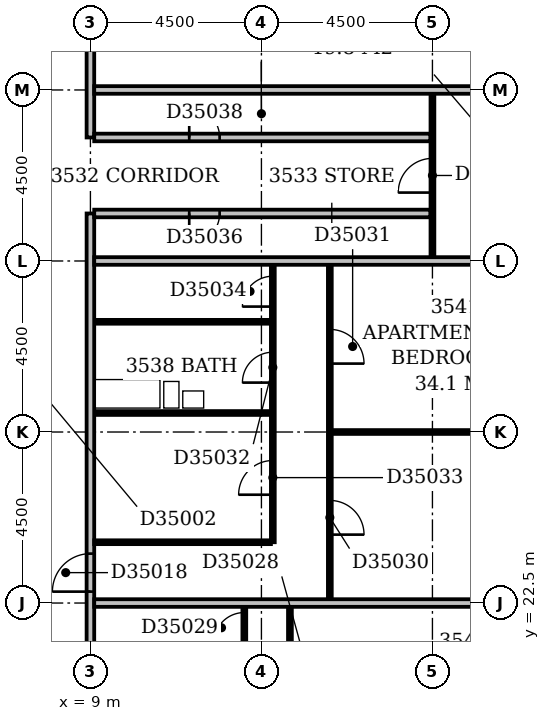
"""IFC4 building model, lengths in metres.
Left out: names, types, materials, properties, quantities, classifications, styles, units other than length and angle.
Written with IfcOpenShell. Run it as: python <this file> out.ifc"""

import sys

from ifc_helpers import new_model, si_unit, direction, frame, frame_2d, origin, place, context, subcontext, project, spatial, rectangle, extrude, element, fill, save


model = new_model("IFC4")
c1 = context("Model", 3, precision=1e-05, world=origin(), true_north=direction((0.0, 1.0)))
c2 = subcontext(c1, "Body", "Model", "MODEL_VIEW")
j1 = project(units=[si_unit("LENGTHUNIT", "METRE"), si_unit("PLANEANGLEUNIT", "RADIAN")], contexts=[c1])
p1 = place(None, origin())
s1 = spatial("IfcSite", under=j1, at=p1, CompositionType="ELEMENT")
p2 = place(p1, origin())
s2 = spatial("IfcBuilding", under=s1, at=p2, CompositionType="ELEMENT")
p3 = place(p2, frame((0.0, 0.0, 141.2)))
s3 = spatial("IfcBuildingStorey", under=s2, at=p3, CompositionType="ELEMENT", Elevation=141.2)
p4 = place(p3, frame((9.0, 5.0, 0.0), z_axis=(0.0, 0.0, 1.0), x_axis=(0.0, 1.0, 0.0)))
e1 = element("IfcWall", 1, at=p4, inside=s3, PredefinedType="PARTITIONING", context=c2, shape_type="SweptSolid", body=[
    extrude(rectangle(XDim=27.75, YDim=0.2, at=frame_2d((13.875, 0.0))), origin(), (0.0, 0.0, 1.0), 3.3),
])
p5 = place(p4, frame((17.8, 0.0, 0.0)))
e2 = element("IfcOpeningElement", 2, at=p5, cuts=e1, PredefinedType="OPENING", context=c2, shape_type="SweptSolid", body=[
    extrude(rectangle(XDim=1.0, YDim=2.1, at=frame_2d((0.5, 1.05))), frame((0.0, 0.112, 0.0), z_axis=(0.0, -1.0, 0.0), x_axis=(1.0, 0.0, 0.0)), (0.0, 0.0, 1.0), 0.224),
])
p6 = place(p4, frame((14.95, 0.0, 0.0)))
e3 = element("IfcOpeningElement", 3, at=p6, cuts=e1, PredefinedType="OPENING", context=c2, shape_type="SweptSolid", body=[
    extrude(rectangle(XDim=1.0, YDim=2.1, at=frame_2d((0.5, 1.05))), frame((0.0, 0.112, 0.0), z_axis=(0.0, -1.0, 0.0), x_axis=(1.0, 0.0, 0.0)), (0.0, 0.0, 1.0), 0.224),
])
p7 = place(p4, frame((11.7, 0.0, 0.0)))
e4 = element("IfcOpeningElement", 4, at=p7, cuts=e1, PredefinedType="OPENING", context=c2, shape_type="SweptSolid", body=[
    extrude(rectangle(XDim=1.0, YDim=2.1, at=frame_2d((0.5, 1.05))), frame((0.0, 0.112, 0.0), z_axis=(0.0, -1.0, 0.0), x_axis=(1.0, 0.0, 0.0)), (0.0, 0.0, 1.0), 0.224),
])
p8 = place(p4, frame((1.5, 0.0, 0.0)))
e5 = element("IfcOpeningElement", 5, at=p8, cuts=e1, PredefinedType="OPENING", context=c2, shape_type="SweptSolid", body=[
    extrude(rectangle(XDim=0.9, YDim=2.1, at=frame_2d((0.45, 1.05))), frame((0.0, 0.112, 0.0), z_axis=(0.0, -1.0, 0.0), x_axis=(1.0, 0.0, 0.0)), (0.0, 0.0, 1.0), 0.224),
])
p9 = place(p3, frame((14.25, 18.1, 0.0), z_axis=(0.0, 0.0, 1.0), x_axis=(0.0, 1.0, 0.0)))
e6 = element("IfcWall", 6, at=p9, inside=s3, PredefinedType="PARTITIONING", context=c2, shape_type="SweptSolid", body=[
    extrude(rectangle(XDim=4.3, YDim=0.1, at=frame_2d((2.15, 0.0))), origin(), (0.0, 0.0, 1.0), 3.3),
])
p10 = place(p9, frame((1.7, 0.0, 0.0)))
e7 = element("IfcOpeningElement", 7, at=p10, cuts=e6, PredefinedType="OPENING", context=c2, shape_type="SweptSolid", body=[
    extrude(rectangle(XDim=0.9, YDim=2.1, at=frame_2d((0.45, 1.05))), frame((0.0, 0.062, 0.0), z_axis=(0.0, -1.0, 0.0), x_axis=(1.0, 0.0, 0.0)), (0.0, 0.0, 1.0), 0.124),
])
p11 = place(p3, frame((13.05, 21.2, 0.0), z_axis=(0.0, 0.0, 1.0), x_axis=(0.0, 1.0, 0.0)))
e8 = element("IfcWall", 8, at=p11, inside=s3, PredefinedType="PARTITIONING", context=c2, shape_type="SweptSolid", body=[
    extrude(rectangle(XDim=1.2, YDim=0.1, at=frame_2d((0.6, 0.0))), origin(), (0.0, 0.0, 1.0), 3.3),
])
p12 = place(p11, frame((0.25, 0.0, 0.0)))
e9 = element("IfcOpeningElement", 9, at=p12, cuts=e8, PredefinedType="OPENING", context=c2, shape_type="SweptSolid", body=[
    extrude(rectangle(XDim=0.8, YDim=2.1, at=frame_2d((0.4, 1.05))), frame((0.0, 0.062, 0.0), z_axis=(0.0, -1.0, 0.0), x_axis=(1.0, 0.0, 0.0)), (0.0, 0.0, 1.0), 0.124),
])
p13 = place(p3, frame((9.1, 22.5, 0.0), z_axis=(0.0, 0.0, 1.0), x_axis=(1.0, 0.0, 0.0)))
e10 = element("IfcWall", 10, at=p13, inside=s3, PredefinedType="PARTITIONING", context=c2, shape_type="SweptSolid", body=[
    extrude(rectangle(XDim=12.9, YDim=0.2, at=frame_2d((6.45, 0.0))), origin(), (0.0, 0.0, 1.0), 3.3),
])
p14 = place(p3, frame((15.3, 22.6, 0.0), z_axis=(0.0, 0.0, 1.0), x_axis=(0.0, 1.0, 0.0)))
e11 = element("IfcWall", 11, at=p14, inside=s3, PredefinedType="PARTITIONING", context=c2, shape_type="SweptSolid", body=[
    extrude(rectangle(XDim=8.8, YDim=0.1, at=frame_2d((4.4, 0.0))), origin(), (0.0, 0.0, 1.0), 3.3),
])
p15 = place(p14, frame((1.7, 0.0, 0.0)))
e12 = element("IfcOpeningElement", 12, at=p15, cuts=e11, PredefinedType="OPENING", context=c2, shape_type="SweptSolid", body=[
    extrude(rectangle(XDim=0.9, YDim=2.1, at=frame_2d((0.45, 1.05))), frame((0.0, 0.062, 0.0), z_axis=(0.0, -1.0, 0.0), x_axis=(1.0, 0.0, 0.0)), (0.0, 0.0, 1.0), 0.124),
])
p16 = place(p14, frame((6.2, 0.0, 0.0)))
e13 = element("IfcOpeningElement", 13, at=p16, cuts=e11, PredefinedType="OPENING", context=c2, shape_type="SweptSolid", body=[
    extrude(rectangle(XDim=0.9, YDim=2.1, at=frame_2d((0.45, 1.05))), frame((0.0, 0.062, 0.0), z_axis=(0.0, -1.0, 0.0), x_axis=(1.0, 0.0, 0.0)), (0.0, 0.0, 1.0), 0.124),
])
p17 = place(p3, frame((9.1, 24.1, 0.0), z_axis=(0.0, 0.0, 1.0), x_axis=(1.0, 0.0, 0.0)))
e14 = element("IfcWall", 14, at=p17, inside=s3, PredefinedType="PARTITIONING", context=c2, shape_type="SweptSolid", body=[
    extrude(rectangle(XDim=4.65, YDim=0.1, at=frame_2d((2.325, 0.0))), origin(), (0.0, 0.0, 1.0), 3.3),
])
p18 = place(p3, frame((13.8, 24.1, 0.0), z_axis=(0.0, 0.0, 1.0), x_axis=(0.0, 1.0, 0.0)))
e15 = element("IfcWall", 15, at=p18, inside=s3, PredefinedType="PARTITIONING", context=c2, shape_type="SweptSolid", body=[
    extrude(rectangle(XDim=7.3, YDim=0.1, at=frame_2d((3.65, 0.0))), origin(), (0.0, 0.0, 1.0), 3.3),
])
p19 = place(p18, frame((4.2, 0.0, 0.0)))
e16 = element("IfcOpeningElement", 16, at=p19, cuts=e15, PredefinedType="OPENING", context=c2, shape_type="SweptSolid", body=[
    extrude(rectangle(XDim=0.8, YDim=2.1, at=frame_2d((0.4, 1.05))), frame((0.0, 0.062, 0.0), z_axis=(0.0, -1.0, 0.0), x_axis=(1.0, 0.0, 0.0)), (0.0, 0.0, 1.0), 0.124),
])
p20 = place(p18, frame((1.25, 0.0, 0.0)))
e17 = element("IfcOpeningElement", 17, at=p20, cuts=e15, PredefinedType="OPENING", context=c2, shape_type="SweptSolid", body=[
    extrude(rectangle(XDim=0.9, YDim=2.1, at=frame_2d((0.45, 1.05))), frame((0.0, 0.062, 0.0), z_axis=(0.0, -1.0, 0.0), x_axis=(1.0, 0.0, 0.0)), (0.0, 0.0, 1.0), 0.124),
])
p21 = place(p18, frame((6.2, 0.0, 0.0)))
e18 = element("IfcOpeningElement", 18, at=p21, cuts=e15, PredefinedType="OPENING", context=c2, shape_type="SweptSolid", body=[
    extrude(rectangle(XDim=0.8, YDim=2.1, at=frame_2d((0.4, 1.05))), frame((0.0, 0.062, 0.0), z_axis=(0.0, -1.0, 0.0), x_axis=(1.0, 0.0, 0.0)), (0.0, 0.0, 1.0), 0.124),
])
p22 = place(p3, frame((15.35, 27.0, 0.0), z_axis=(0.0, 0.0, 1.0), x_axis=(1.0, 0.0, 0.0)))
e19 = element("IfcWall", 19, at=p22, inside=s3, PredefinedType="PARTITIONING", context=c2, shape_type="SweptSolid", body=[
    extrude(rectangle(XDim=6.65, YDim=0.1, at=frame_2d((3.325, 0.0))), origin(), (0.0, 0.0, 1.0), 2.7),
])
p23 = place(p3, frame((9.1, 27.5, 0.0), z_axis=(0.0, 0.0, 1.0), x_axis=(1.0, 0.0, 0.0)))
e20 = element("IfcWall", 20, at=p23, inside=s3, PredefinedType="PLUMBINGWALL", context=c2, shape_type="SweptSolid", body=[
    extrude(rectangle(XDim=4.65, YDim=0.1, at=frame_2d((2.325, 0.0))), origin(), (0.0, 0.0, 1.0), 2.7),
])
p24 = place(p3, frame((9.1, 29.9, 0.0), z_axis=(0.0, 0.0, 1.0), x_axis=(1.0, 0.0, 0.0)))
e21 = element("IfcWall", 21, at=p24, inside=s3, PredefinedType="PLUMBINGWALL", context=c2, shape_type="SweptSolid", body=[
    extrude(rectangle(XDim=4.65, YDim=0.1, at=frame_2d((2.325, 0.0))), origin(), (0.0, 0.0, 1.0), 3.3),
])
p25 = place(p3, frame((9.1, 31.5, 0.0), z_axis=(0.0, 0.0, 1.0), x_axis=(1.0, 0.0, 0.0)))
e22 = element("IfcWall", 22, at=p25, inside=s3, PredefinedType="PARTITIONING", context=c2, shape_type="SweptSolid", body=[
    extrude(rectangle(XDim=12.9, YDim=0.2, at=frame_2d((6.45, 0.0))), origin(), (0.0, 0.0, 1.0), 3.3),
])
p26 = place(p3, frame((18.0, 31.6, 0.0), z_axis=(0.0, 0.0, 1.0), x_axis=(0.0, 1.0, 0.0)))
e23 = element("IfcWall", 23, at=p26, inside=s3, PredefinedType="PARTITIONING", context=c2, shape_type="SweptSolid", body=[
    extrude(rectangle(XDim=4.3, YDim=0.1, at=frame_2d((2.15, 0.0))), origin(), (0.0, 0.0, 1.0), 3.3),
])
p27 = place(p26, frame((1.7, 0.0, 0.0)))
e24 = element("IfcOpeningElement", 24, at=p27, cuts=e23, PredefinedType="OPENING", context=c2, shape_type="SweptSolid", body=[
    extrude(rectangle(XDim=0.9, YDim=2.1, at=frame_2d((0.45, 1.05))), frame((0.0, 0.062, 0.0), z_axis=(0.0, -1.0, 0.0), x_axis=(1.0, 0.0, 0.0)), (0.0, 0.0, 1.0), 0.124),
])
p28 = place(p3, frame((9.1, 32.75, 0.0), z_axis=(0.0, 0.0, 1.0), x_axis=(1.0, 0.0, 0.0)))
e25 = element("IfcWall", 25, at=p28, inside=s3, PredefinedType="PARTITIONING", context=c2, shape_type="SweptSolid", body=[
    extrude(rectangle(XDim=8.85, YDim=0.2, at=frame_2d((4.425, 0.0))), origin(), (0.0, 0.0, 1.0), 3.3),
])
p29 = place(p28, frame((2.5, 0.0, 0.0)))
e26 = element("IfcOpeningElement", 26, at=p29, cuts=e25, PredefinedType="OPENING", context=c2, shape_type="SweptSolid", body=[
    extrude(rectangle(XDim=0.8, YDim=2.1, at=frame_2d((0.4, 1.05))), frame((0.0, 0.112, 0.0), z_axis=(0.0, -1.0, 0.0), x_axis=(1.0, 0.0, 0.0)), (0.0, 0.0, 1.0), 0.224),
])
p30 = place(p3, frame((9.0, 34.75, 0.0), z_axis=(0.0, 0.0, 1.0), x_axis=(0.0, 1.0, 0.0)))
e27 = element("IfcWall", 27, at=p30, inside=s3, PredefinedType="PARTITIONING", context=c2, shape_type="SweptSolid", body=[
    extrude(rectangle(XDim=14.75, YDim=0.2, at=frame_2d((7.375, 0.0))), origin(), (0.0, 0.0, 1.0), 3.3),
])
p31 = place(p30, frame((5.25, 0.0, 0.0)))
e28 = element("IfcOpeningElement", 28, at=p31, cuts=e27, PredefinedType="OPENING", context=c2, shape_type="SweptSolid", body=[
    extrude(rectangle(XDim=0.9, YDim=2.1, at=frame_2d((0.45, 1.05))), frame((0.0, 0.112, 0.0), z_axis=(0.0, -1.0, 0.0), x_axis=(1.0, 0.0, 0.0)), (0.0, 0.0, 1.0), 0.224),
])
p32 = place(p3, frame((9.1, 34.75, 0.0), z_axis=(0.0, 0.0, 1.0), x_axis=(1.0, 0.0, 0.0)))
e29 = element("IfcWall", 29, at=p32, inside=s3, PredefinedType="PARTITIONING", context=c2, shape_type="SweptSolid", body=[
    extrude(rectangle(XDim=8.85, YDim=0.2, at=frame_2d((4.425, 0.0))), origin(), (0.0, 0.0, 1.0), 3.3),
])
p33 = place(p32, frame((2.5, 0.0, 0.0)))
e30 = element("IfcOpeningElement", 30, at=p33, cuts=e29, PredefinedType="OPENING", context=c2, shape_type="SweptSolid", body=[
    extrude(rectangle(XDim=0.8, YDim=2.1, at=frame_2d((0.4, 1.05))), frame((0.0, 0.112, 0.0), z_axis=(0.0, -1.0, 0.0), x_axis=(1.0, 0.0, 0.0)), (0.0, 0.0, 1.0), 0.224),
])
p34 = place(p3, frame((9.1, 36.0, 0.0), z_axis=(0.0, 0.0, 1.0), x_axis=(1.0, 0.0, 0.0)))
e31 = element("IfcWall", 31, at=p34, inside=s3, PredefinedType="PARTITIONING", context=c2, shape_type="SweptSolid", body=[
    extrude(rectangle(XDim=12.9, YDim=0.2, at=frame_2d((6.45, 0.0))), origin(), (0.0, 0.0, 1.0), 3.3),
])
p35 = place(p5, origin())
e32 = element("IfcDoor", 32, at=p35, inside=s3, OperationType="SINGLE_SWING_LEFT", PredefinedType="DOOR", context=c2, shape_type="SweptSolid", body=[
    extrude(rectangle(XDim=1.0, YDim=2.1, at=frame_2d((0.5, 1.05))), frame((0.0, 0.025, 0.0), z_axis=(0.0, -1.0, 0.0), x_axis=(1.0, 0.0, 0.0)), (0.0, 0.0, 1.0), 0.05),
])
fill(e2, e32)
p36 = place(p12, origin())
e33 = element("IfcDoor", 33, at=p36, inside=s3, OperationType="SINGLE_SWING_LEFT", PredefinedType="DOOR", context=c2, shape_type="SweptSolid", body=[
    extrude(rectangle(XDim=0.8, YDim=2.1, at=frame_2d((0.4, 1.05))), frame((0.0, 0.025, 0.0), z_axis=(0.0, -1.0, 0.0), x_axis=(1.0, 0.0, 0.0)), (0.0, 0.0, 1.0), 0.05),
])
fill(e9, e33)
p37 = place(p15, frame((0.9, 0.0, 0.0), z_axis=(0.0, 0.0, 1.0), x_axis=(-1.0, 0.0, 0.0)))
e34 = element("IfcDoor", 34, at=p37, inside=s3, OperationType="SINGLE_SWING_RIGHT", PredefinedType="DOOR", context=c2, shape_type="SweptSolid", body=[
    extrude(rectangle(XDim=0.9, YDim=2.1, at=frame_2d((0.45, 1.05))), frame((0.0, 0.025, 0.0), z_axis=(0.0, -1.0, 0.0), x_axis=(1.0, 0.0, 0.0)), (0.0, 0.0, 1.0), 0.05),
])
fill(e12, e34)
p38 = place(p16, frame((0.9, 0.0, 0.0), z_axis=(0.0, 0.0, 1.0), x_axis=(-1.0, 0.0, 0.0)))
e35 = element("IfcDoor", 35, at=p38, inside=s3, OperationType="SINGLE_SWING_RIGHT", PredefinedType="DOOR", context=c2, shape_type="SweptSolid", body=[
    extrude(rectangle(XDim=0.9, YDim=2.1, at=frame_2d((0.45, 1.05))), frame((0.0, 0.025, 0.0), z_axis=(0.0, -1.0, 0.0), x_axis=(1.0, 0.0, 0.0)), (0.0, 0.0, 1.0), 0.05),
])
fill(e13, e35)
p39 = place(p19, origin())
e36 = element("IfcDoor", 36, at=p39, inside=s3, OperationType="SINGLE_SWING_LEFT", PredefinedType="DOOR", context=c2, shape_type="SweptSolid", body=[
    extrude(rectangle(XDim=0.8, YDim=2.1, at=frame_2d((0.4, 1.05))), frame((0.0, 0.025, 0.0), z_axis=(0.0, -1.0, 0.0), x_axis=(1.0, 0.0, 0.0)), (0.0, 0.0, 1.0), 0.05),
])
fill(e16, e36)
p40 = place(p20, origin())
e37 = element("IfcDoor", 37, at=p40, inside=s3, OperationType="SINGLE_SWING_LEFT", PredefinedType="DOOR", context=c2, shape_type="SweptSolid", body=[
    extrude(rectangle(XDim=0.9, YDim=2.1, at=frame_2d((0.45, 1.05))), frame((0.0, 0.025, 0.0), z_axis=(0.0, -1.0, 0.0), x_axis=(1.0, 0.0, 0.0)), (0.0, 0.0, 1.0), 0.05),
])
fill(e17, e37)
p41 = place(p21, origin())
e38 = element("IfcDoor", 38, at=p41, inside=s3, OperationType="SINGLE_SWING_LEFT", PredefinedType="DOOR", context=c2, shape_type="SweptSolid", body=[
    extrude(rectangle(XDim=0.8, YDim=2.1, at=frame_2d((0.4, 1.05))), frame((0.0, 0.025, 0.0), z_axis=(0.0, -1.0, 0.0), x_axis=(1.0, 0.0, 0.0)), (0.0, 0.0, 1.0), 0.05),
])
fill(e18, e38)
p42 = place(p27, origin())
e39 = element("IfcDoor", 39, at=p42, inside=s3, OperationType="SINGLE_SWING_LEFT", PredefinedType="DOOR", context=c2, shape_type="SweptSolid", body=[
    extrude(rectangle(XDim=0.9, YDim=2.1, at=frame_2d((0.45, 1.05))), frame((0.0, 0.025, 0.0), z_axis=(0.0, -1.0, 0.0), x_axis=(1.0, 0.0, 0.0)), (0.0, 0.0, 1.0), 0.05),
])
fill(e24, e39)
p43 = place(p29, frame((0.8, 0.0, 0.0), z_axis=(0.0, 0.0, 1.0), x_axis=(-1.0, 0.0, 0.0)))
e40 = element("IfcDoor", 40, at=p43, inside=s3, OperationType="SINGLE_SWING_RIGHT", PredefinedType="DOOR", context=c2, shape_type="SweptSolid", body=[
    extrude(rectangle(XDim=0.8, YDim=2.1, at=frame_2d((0.4, 1.05))), frame((0.0, 0.025, 0.0), z_axis=(0.0, -1.0, 0.0), x_axis=(1.0, 0.0, 0.0)), (0.0, 0.0, 1.0), 0.05),
])
fill(e26, e40)
p44 = place(p33, origin())
e41 = element("IfcDoor", 41, at=p44, inside=s3, OperationType="SINGLE_SWING_LEFT", PredefinedType="DOOR", context=c2, shape_type="SweptSolid", body=[
    extrude(rectangle(XDim=0.8, YDim=2.1, at=frame_2d((0.4, 1.05))), frame((0.0, 0.025, 0.0), z_axis=(0.0, -1.0, 0.0), x_axis=(1.0, 0.0, 0.0)), (0.0, 0.0, 1.0), 0.05),
])
fill(e30, e41)
save(model, sys.argv[1])
